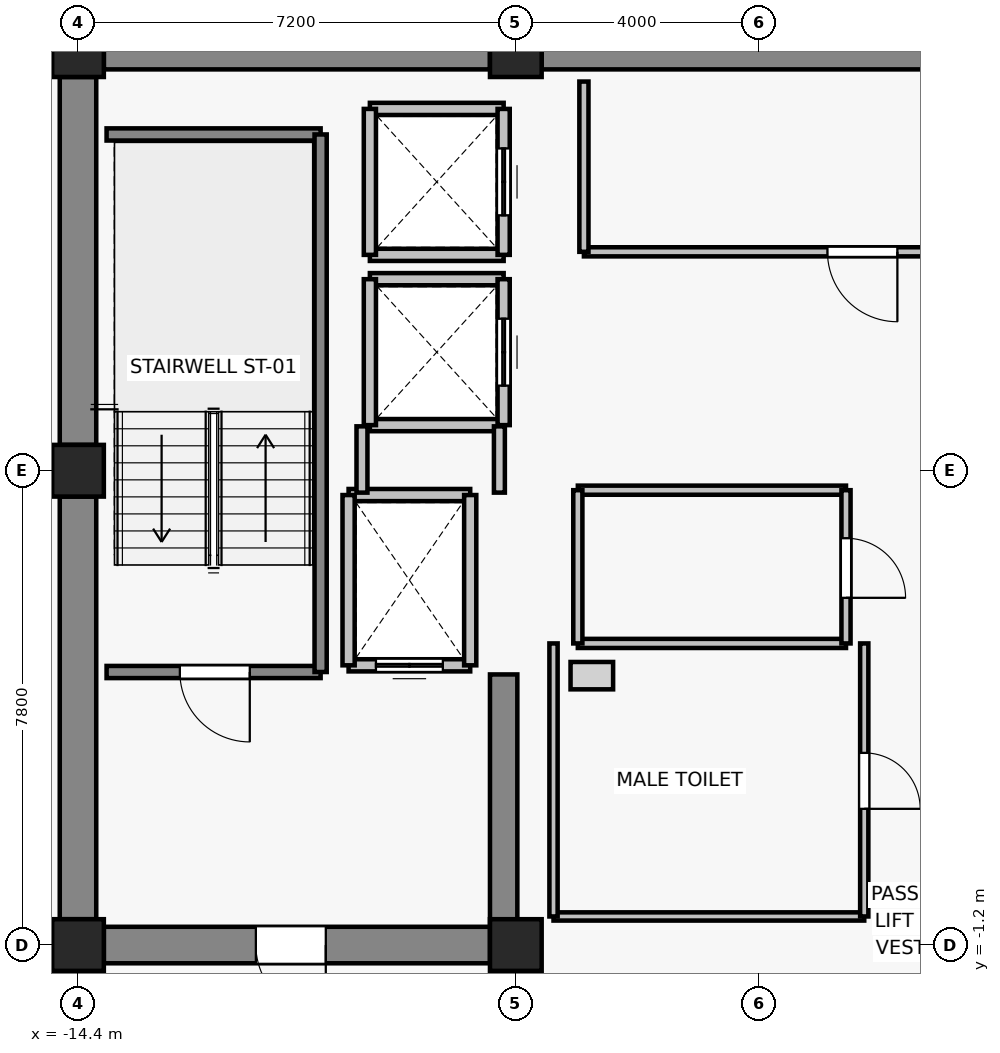
"""IFC4 building model, lengths in metres.
Left out: names, types, materials, properties, quantities, classifications, styles, units other than length and angle.
Written with IfcOpenShell. Run it as: python <this file> out.ifc"""

import sys

from ifc_helpers import new_model, si_unit, direction, frame, frame_2d, origin, origin_2d, place, context, subcontext, project, spatial, rectangle, extrude, source, transform, mapped, element, fill, save


model = new_model("IFC4")
c1 = context("Model", 3, precision=1e-05, world=origin(), true_north=direction((0.0, 1.0)))
c2 = subcontext(c1, "Body", "Model", "MODEL_VIEW")
j1 = project(units=[si_unit("LENGTHUNIT", "METRE"), si_unit("PLANEANGLEUNIT", "RADIAN")], contexts=[c1])
p1 = place(None, origin())
s1 = spatial("IfcSite", under=j1, at=p1, CompositionType="ELEMENT")
p2 = place(p1, origin())
s2 = spatial("IfcBuilding", under=s1, at=p2, CompositionType="ELEMENT")
p3 = place(p2, frame((0.0, 0.0, 232.0)))
s3 = spatial("IfcBuildingStorey", under=s2, at=p3, CompositionType="ELEMENT", Elevation=232.0)
for number, where, z_axis, x_axis in (
    (1, (-14.4, -1.2, 0.0), (0.0, 0.0, 1.0), (1.0, 0.0, 0.0)),
    (2, (-7.2, -1.2, 0.0), (0.0, 0.0, 1.0), (1.0, 0.0, 0.0)),
    (3, (-14.4, 6.6, 0.0), (0.0, 0.0, 1.0), (1.0, 0.0, 0.0)),
    (4, (-14.4, 13.5, 0.0), (0.0, 0.0, 1.0), (1.0, 0.0, 0.0)),
    (5, (-7.2, 13.5, 0.0), (0.0, 0.0, 1.0), (1.0, 0.0, 0.0)),
):
    element("IfcColumn", number, at=place(p3, frame(where, z_axis=z_axis, x_axis=x_axis)), inside=s3, PredefinedType="COLUMN", context=c2, shape_type="SweptSolid", body=[
        extrude(rectangle(XDim=0.85, YDim=0.85, at=origin_2d()), origin(), (0.0, 0.0, 1.0), 3.3),
    ])
p4 = place(p3, frame((-13.975, 13.5, 0.0), z_axis=(0.0, 0.0, 1.0), x_axis=(1.0, 0.0, 0.0)))
e6 = element("IfcWall", 6, at=p4, inside=s3, PredefinedType="SHEAR", context=c2, shape_type="SweptSolid", body=[
    extrude(rectangle(XDim=6.35, YDim=0.6, at=frame_2d((3.175, 0.0))), origin(), (0.0, 0.0, 1.0), 3.075),
])
p5 = place(p3, frame((-6.775, 13.5, 0.0), z_axis=(0.0, 0.0, 1.0), x_axis=(1.0, 0.0, 0.0)))
e7 = element("IfcWall", 7, at=p5, inside=s3, PredefinedType="SHEAR", context=c2, shape_type="SweptSolid", body=[
    extrude(rectangle(XDim=13.55, YDim=0.6, at=frame_2d((6.775, 0.0))), origin(), (0.0, 0.0, 1.0), 3.075),
])
p6 = place(p3, frame((-14.4, -0.775, 0.0), z_axis=(0.0, 0.0, 1.0), x_axis=(0.0, 1.0, 0.0)))
e8 = element("IfcWall", 8, at=p6, inside=s3, PredefinedType="SHEAR", context=c2, shape_type="SweptSolid", body=[
    extrude(rectangle(XDim=6.95, YDim=0.6, at=frame_2d((3.475, 0.0))), origin(), (0.0, 0.0, 1.0), 3.075),
])
p7 = place(p3, frame((-14.4, 7.025, 0.0), z_axis=(0.0, 0.0, 1.0), x_axis=(0.0, 1.0, 0.0)))
e9 = element("IfcWall", 9, at=p7, inside=s3, PredefinedType="SHEAR", context=c2, shape_type="SweptSolid", body=[
    extrude(rectangle(XDim=6.05, YDim=0.6, at=frame_2d((3.025, 0.0))), origin(), (0.0, 0.0, 1.0), 3.075),
])
p8 = place(p3, frame((-7.625, -1.2, 0.0), z_axis=(0.0, 0.0, 1.0), x_axis=(-1.0, 0.0, 0.0)))
e10 = element("IfcWall", 10, at=p8, inside=s3, PredefinedType="SHEAR", context=c2, shape_type="SweptSolid", body=[
    extrude(rectangle(XDim=6.35, YDim=0.6, at=frame_2d((3.175, 0.0))), origin(), (0.0, 0.0, 1.0), 3.075),
])
p9 = place(p8, frame((2.7, 0.0, 0.0)))
e11 = element("IfcOpeningElement", 11, at=p9, cuts=e10, PredefinedType="OPENING", context=c2, shape_type="SweptSolid", body=[
    extrude(rectangle(XDim=1.15, YDim=2.15, at=frame_2d((0.575, 1.075))), frame((0.0, 0.31, 0.0), z_axis=(0.0, -1.0, 0.0), x_axis=(1.0, 0.0, 0.0)), (0.0, 0.0, 1.0), 0.62),
])
p10 = place(p3, frame((-7.4, -0.9, 0.0), z_axis=(0.0, 0.0, 1.0), x_axis=(0.0, 1.0, 0.0)))
e12 = element("IfcWall", 12, at=p10, inside=s3, PredefinedType="SHEAR", context=c2, shape_type="SweptSolid", body=[
    extrude(rectangle(XDim=4.15, YDim=0.45, at=frame_2d((2.075, 0.0))), origin(), (0.0, 0.0, 1.0), 3.075),
])
p11 = place(p3, frame((-7.95, 3.4, 0.0), z_axis=(0.0, 0.0, 1.0), x_axis=(-1.0, 0.0, 0.0)))
e13 = element("IfcWall", 13, at=p11, inside=s3, PredefinedType="SOLIDWALL", context=c2, shape_type="SweptSolid", body=[
    extrude(rectangle(XDim=2.0, YDim=0.2, at=frame_2d((1.0, 0.0))), origin(), (0.0, 0.0, 1.0), 3.075),
])
p12 = place(p11, frame((0.45, 0.0, 0.0)))
e14 = element("IfcOpeningElement", 14, at=p12, cuts=e13, PredefinedType="OPENING", context=c2, shape_type="SweptSolid", body=[
    extrude(rectangle(XDim=1.1, YDim=2.2, at=frame_2d((0.55, 1.1))), frame((0.0, 0.11, 0.0), z_axis=(0.0, -1.0, 0.0), x_axis=(1.0, 0.0, 0.0)), (0.0, 0.0, 1.0), 0.22),
])
p13 = place(p3, frame((-9.95, 6.2, 0.0), z_axis=(0.0, 0.0, 1.0), x_axis=(1.0, 0.0, 0.0)))
e15 = element("IfcWall", 15, at=p13, inside=s3, PredefinedType="SOLIDWALL", context=c2, shape_type="SweptSolid", body=[
    extrude(rectangle(XDim=2.0, YDim=0.2, at=frame_2d((1.0, 0.0))), origin(), (0.0, 0.0, 1.0), 3.075),
])
for number, where, z_axis, x_axis in (
    (16, (-9.95, 3.4, 0.0), (0.0, 0.0, 1.0), (0.0, 1.0, 0.0)),
    (17, (-7.95, 6.2, 0.0), (0.0, 0.0, 1.0), (0.0, -1.0, 0.0)),
):
    element("IfcWall", number, at=place(p3, frame(where, z_axis=z_axis, x_axis=x_axis)), inside=s3, PredefinedType="SOLIDWALL", context=c2, shape_type="SweptSolid", body=[
        extrude(rectangle(XDim=2.8, YDim=0.2, at=frame_2d((1.4, 0.0))), origin(), (0.0, 0.0, 1.0), 3.075),
    ])
for number, where, z_axis, x_axis in (
    (18, (-7.4, 7.35, 0.0), (0.0, 0.0, 1.0), (-1.0, 0.0, 0.0)),
    (19, (-9.6, 9.75, 0.0), (0.0, 0.0, 1.0), (1.0, 0.0, 0.0)),
):
    element("IfcWall", number, at=place(p3, frame(where, z_axis=z_axis, x_axis=x_axis)), inside=s3, PredefinedType="SOLIDWALL", context=c2, shape_type="SweptSolid", body=[
        extrude(rectangle(XDim=2.2, YDim=0.2, at=frame_2d((1.1, 0.0))), origin(), (0.0, 0.0, 1.0), 2.615),
    ])
p14 = place(p3, frame((-9.6, 7.35, 0.0), z_axis=(0.0, 0.0, 1.0), x_axis=(0.0, 1.0, 0.0)))
e20 = element("IfcWall", 20, at=p14, inside=s3, PredefinedType="SOLIDWALL", context=c2, shape_type="SweptSolid", body=[
    extrude(rectangle(XDim=2.4, YDim=0.2, at=frame_2d((1.2, 0.0))), origin(), (0.0, 0.0, 1.0), 3.075),
])
p15 = place(p3, frame((-7.4, 9.75, 0.0), z_axis=(0.0, 0.0, 1.0), x_axis=(0.0, -1.0, 0.0)))
e21 = element("IfcWall", 21, at=p15, inside=s3, PredefinedType="SOLIDWALL", context=c2, shape_type="SweptSolid", body=[
    extrude(rectangle(XDim=2.4, YDim=0.2, at=frame_2d((1.2, 0.0))), origin(), (0.0, 0.0, 1.0), 2.615),
])
p16 = place(p15, frame((0.65, 0.0, 0.0)))
e22 = element("IfcOpeningElement", 22, at=p16, cuts=e21, PredefinedType="OPENING", context=c2, shape_type="SweptSolid", body=[
    extrude(rectangle(XDim=1.1, YDim=2.2, at=frame_2d((0.55, 1.1))), frame((0.0, 0.11, 0.0), z_axis=(0.0, -1.0, 0.0), x_axis=(1.0, 0.0, 0.0)), (0.0, 0.0, 1.0), 0.22),
])
for number, where, z_axis, x_axis in (
    (23, (-7.4, 10.15, 0.0), (0.0, 0.0, 1.0), (-1.0, 0.0, 0.0)),
    (24, (-9.6, 12.55, 0.0), (0.0, 0.0, 1.0), (1.0, 0.0, 0.0)),
):
    element("IfcWall", number, at=place(p3, frame(where, z_axis=z_axis, x_axis=x_axis)), inside=s3, PredefinedType="SOLIDWALL", context=c2, shape_type="SweptSolid", body=[
        extrude(rectangle(XDim=2.2, YDim=0.2, at=frame_2d((1.1, 0.0))), origin(), (0.0, 0.0, 1.0), 2.615),
    ])
p17 = place(p3, frame((-9.6, 10.15, 0.0), z_axis=(0.0, 0.0, 1.0), x_axis=(0.0, 1.0, 0.0)))
e25 = element("IfcWall", 25, at=p17, inside=s3, PredefinedType="SOLIDWALL", context=c2, shape_type="SweptSolid", body=[
    extrude(rectangle(XDim=2.4, YDim=0.2, at=frame_2d((1.2, 0.0))), origin(), (0.0, 0.0, 1.0), 3.075),
])
p18 = place(p3, frame((-7.4, 12.55, 0.0), z_axis=(0.0, 0.0, 1.0), x_axis=(0.0, -1.0, 0.0)))
e26 = element("IfcWall", 26, at=p18, inside=s3, PredefinedType="SOLIDWALL", context=c2, shape_type="SweptSolid", body=[
    extrude(rectangle(XDim=2.4, YDim=0.2, at=frame_2d((1.2, 0.0))), origin(), (0.0, 0.0, 1.0), 2.615),
])
p19 = place(p18, frame((0.65, 0.0, 0.0)))
e27 = element("IfcOpeningElement", 27, at=p19, cuts=e26, PredefinedType="OPENING", context=c2, shape_type="SweptSolid", body=[
    extrude(rectangle(XDim=1.1, YDim=2.2, at=frame_2d((0.55, 1.1))), frame((0.0, 0.11, 0.0), z_axis=(0.0, -1.0, 0.0), x_axis=(1.0, 0.0, 0.0)), (0.0, 0.0, 1.0), 0.22),
])
p20 = place(p3, frame((-10.41, 3.29, 0.0), z_axis=(0.0, 0.0, 1.0), x_axis=(-1.0, 0.0, 0.0)))
e28 = element("IfcWall", 28, at=p20, inside=s3, PredefinedType="SOLIDWALL", context=c2, shape_type="SweptSolid", body=[
    extrude(rectangle(XDim=3.52, YDim=0.2, at=frame_2d((1.76, 0.0))), origin(), (0.0, 0.0, 1.0), 3.075),
])
p21 = place(p20, frame((1.165, 0.0, 0.0)))
e29 = element("IfcOpeningElement", 29, at=p21, cuts=e28, PredefinedType="OPENING", context=c2, shape_type="SweptSolid", body=[
    extrude(rectangle(XDim=1.15, YDim=2.15, at=frame_2d((0.575, 1.075))), frame((0.0, 0.11, 0.0), z_axis=(0.0, -1.0, 0.0), x_axis=(1.0, 0.0, 0.0)), (0.0, 0.0, 1.0), 0.22),
])
p22 = place(p3, frame((-13.93, 12.13, 0.0), z_axis=(0.0, 0.0, 1.0), x_axis=(1.0, 0.0, 0.0)))
e30 = element("IfcWall", 30, at=p22, inside=s3, PredefinedType="SOLIDWALL", context=c2, shape_type="SweptSolid", body=[
    extrude(rectangle(XDim=3.52, YDim=0.2, at=frame_2d((1.76, 0.0))), origin(), (0.0, 0.0, 1.0), 3.075),
])
p23 = place(p3, frame((-10.41, 12.13, 0.0), z_axis=(0.0, 0.0, 1.0), x_axis=(0.0, -1.0, 0.0)))
e31 = element("IfcWall", 31, at=p23, inside=s3, PredefinedType="SOLIDWALL", context=c2, shape_type="SweptSolid", body=[
    extrude(rectangle(XDim=8.84, YDim=0.2, at=frame_2d((4.42, 0.0))), origin(), (0.0, 0.0, 1.0), 3.075),
])
p24 = place(p3, frame((-9.73, 6.24, 0.0), z_axis=(0.0, 0.0, 1.0), x_axis=(0.0, 1.0, 0.0)))
e32 = element("IfcWall", 32, at=p24, inside=s3, PredefinedType="PARTITIONING", context=c2, shape_type="SweptSolid", body=[
    extrude(rectangle(XDim=1.09, YDim=0.18, at=frame_2d((0.545, 0.0))), origin(), (0.0, 0.0, 1.0), 3.075),
])
p25 = place(p3, frame((-7.47, 7.33, 0.0), z_axis=(0.0, 0.0, 1.0), x_axis=(0.0, -1.0, 0.0)))
e33 = element("IfcWall", 33, at=p25, inside=s3, PredefinedType="PARTITIONING", context=c2, shape_type="SweptSolid", body=[
    extrude(rectangle(XDim=1.09, YDim=0.18, at=frame_2d((0.545, 0.0))), origin(), (0.0, 0.0, 1.0), 2.615),
])
p26 = place(p3, frame((6.08, 10.2, 0.0), z_axis=(0.0, 0.0, 1.0), x_axis=(-1.0, 0.0, 0.0)))
e34 = element("IfcWall", 34, at=p26, inside=s3, PredefinedType="PARTITIONING", context=c2, shape_type="SweptSolid", body=[
    extrude(rectangle(XDim=12.16, YDim=0.15, at=frame_2d((6.08, 0.0))), origin(), (0.0, 0.0, 1.0), 2.59),
])
p27 = place(p26, frame((7.005, 0.0, 0.0)))
e35 = element("IfcOpeningElement", 35, at=p27, cuts=e34, PredefinedType="OPENING", context=c2, shape_type="SweptSolid", body=[
    extrude(rectangle(XDim=1.15, YDim=2.15, at=frame_2d((0.575, 1.075))), frame((0.0, 0.085, 0.0), z_axis=(0.0, -1.0, 0.0), x_axis=(1.0, 0.0, 0.0)), (0.0, 0.0, 1.0), 0.17),
])
p28 = place(p3, frame((-6.08, 10.2, 0.0), z_axis=(0.0, 0.0, 1.0), x_axis=(0.0, 1.0, 0.0)))
e36 = element("IfcWall", 36, at=p28, inside=s3, PredefinedType="PARTITIONING", context=c2, shape_type="SweptSolid", body=[
    extrude(rectangle(XDim=2.8, YDim=0.15, at=frame_2d((1.4, 0.0))), origin(), (0.0, 0.0, 1.0), 3.075),
])
for number, where, z_axis, x_axis in (
    (37, (-1.77, 3.76, 0.0), (0.0, 0.0, 1.0), (-1.0, 0.0, 0.0)),
    (38, (-6.18, 6.28, 0.0), (0.0, 0.0, 1.0), (1.0, 0.0, 0.0)),
):
    element("IfcWall", number, at=place(p3, frame(where, z_axis=z_axis, x_axis=x_axis)), inside=s3, PredefinedType="PARTITIONING", context=c2, shape_type="SweptSolid", body=[
        extrude(rectangle(XDim=4.41, YDim=0.15, at=frame_2d((2.205, 0.0))), origin(), (0.0, 0.0, 1.0), 3.075),
    ])
p29 = place(p3, frame((-6.18, 3.76, 0.0), z_axis=(0.0, 0.0, 1.0), x_axis=(0.0, 1.0, 0.0)))
e39 = element("IfcWall", 39, at=p29, inside=s3, PredefinedType="PARTITIONING", context=c2, shape_type="SweptSolid", body=[
    extrude(rectangle(XDim=2.52, YDim=0.15, at=frame_2d((1.26, 0.0))), origin(), (0.0, 0.0, 1.0), 3.075),
])
p30 = place(p3, frame((-1.77, 6.28, 0.0), z_axis=(0.0, 0.0, 1.0), x_axis=(0.0, -1.0, 0.0)))
e40 = element("IfcWall", 40, at=p30, inside=s3, PredefinedType="PARTITIONING", context=c2, shape_type="SweptSolid", body=[
    extrude(rectangle(XDim=2.52, YDim=0.15, at=frame_2d((1.26, 0.0))), origin(), (0.0, 0.0, 1.0), 3.075),
])
p31 = place(p30, frame((0.79, 0.0, 0.0)))
e41 = element("IfcOpeningElement", 41, at=p31, cuts=e40, PredefinedType="OPENING", context=c2, shape_type="SweptSolid", body=[
    extrude(rectangle(XDim=0.98, YDim=2.15, at=frame_2d((0.49, 1.075))), frame((0.0, 0.085, 0.0), z_axis=(0.0, -1.0, 0.0), x_axis=(1.0, 0.0, 0.0)), (0.0, 0.0, 1.0), 0.17),
])
p32 = place(p3, frame((-1.47, -0.73, 0.0), z_axis=(0.0, 0.0, 1.0), x_axis=(-1.0, 0.0, 0.0)))
e42 = element("IfcWall", 42, at=p32, inside=s3, PredefinedType="PARTITIONING", context=c2, shape_type="SweptSolid", body=[
    extrude(rectangle(XDim=5.11, YDim=0.135, at=frame_2d((2.555, 0.0))), origin(), (0.0, 0.0, 1.0), 3.075),
])
p33 = place(p3, frame((-6.58, -0.73, 0.0), z_axis=(0.0, 0.0, 1.0), x_axis=(0.0, 1.0, 0.0)))
e43 = element("IfcWall", 43, at=p33, inside=s3, PredefinedType="PARTITIONING", context=c2, shape_type="SweptSolid", body=[
    extrude(rectangle(XDim=4.49, YDim=0.135, at=frame_2d((2.245, 0.0))), origin(), (0.0, 0.0, 1.0), 3.075),
])
p34 = place(p3, frame((-1.47, 3.76, 0.0), z_axis=(0.0, 0.0, 1.0), x_axis=(0.0, -1.0, 0.0)))
e44 = element("IfcWall", 44, at=p34, inside=s3, PredefinedType="PARTITIONING", context=c2, shape_type="SweptSolid", body=[
    extrude(rectangle(XDim=4.49, YDim=0.135, at=frame_2d((2.245, 0.0))), origin(), (0.0, 0.0, 1.0), 3.075),
])
p35 = place(p34, frame((1.8, 0.0, 0.0)))
e45 = element("IfcOpeningElement", 45, at=p35, cuts=e44, PredefinedType="OPENING", context=c2, shape_type="SweptSolid", body=[
    extrude(rectangle(XDim=0.92, YDim=2.1, at=frame_2d((0.46, 1.05))), frame((0.0, 0.077, 0.0), z_axis=(0.0, -1.0, 0.0), x_axis=(1.0, 0.0, 0.0)), (0.0, 0.0, 1.0), 0.155),
])
m1 = source(origin(), c2, "Body", "SweptSolid", [
    extrude(rectangle(XDim=1.1, YDim=2.2, at=frame_2d((0.55, 1.1))), frame((0.0, 0.025, 0.0), z_axis=(0.0, -1.0, 0.0), x_axis=(1.0, 0.0, 0.0)), (0.0, 0.0, 1.0), 0.05),
])
p36 = place(p12, origin())
e46 = element("IfcDoor", 46, at=p36, inside=s3, OperationType="DOUBLE_DOOR_SLIDING", PredefinedType="DOOR", context=c2, shape_type="MappedRepresentation", body=[
    mapped(m1, transform((0.0, 0.0, 0.0), x_axis=(1.0, 0.0, 0.0), y_axis=(0.0, 1.0, 0.0), z_axis=(0.0, 0.0, 1.0), scale=1.0)),
])
fill(e14, e46)
p37 = place(p16, origin())
e47 = element("IfcDoor", 47, at=p37, inside=s3, OperationType="DOUBLE_DOOR_SLIDING", PredefinedType="DOOR", context=c2, shape_type="MappedRepresentation", body=[
    mapped(m1, transform((0.0, 0.0, 0.0), x_axis=(1.0, 0.0, 0.0), y_axis=(0.0, 1.0, 0.0), z_axis=(0.0, 0.0, 1.0), scale=1.0)),
])
fill(e22, e47)
p38 = place(p19, origin())
e48 = element("IfcDoor", 48, at=p38, inside=s3, OperationType="DOUBLE_DOOR_SLIDING", PredefinedType="DOOR", context=c2, shape_type="MappedRepresentation", body=[
    mapped(m1, transform((0.0, 0.0, 0.0), x_axis=(1.0, 0.0, 0.0), y_axis=(0.0, 1.0, 0.0), z_axis=(0.0, 0.0, 1.0), scale=1.0)),
])
fill(e27, e48)
m2 = source(origin(), c2, "Body", "SweptSolid", [
    extrude(rectangle(XDim=1.15, YDim=2.15, at=frame_2d((0.575, 1.075))), frame((0.0, 0.025, 0.0), z_axis=(0.0, -1.0, 0.0), x_axis=(1.0, 0.0, 0.0)), (0.0, 0.0, 1.0), 0.05),
])
p39 = place(p21, origin())
e49 = element("IfcDoor", 49, at=p39, inside=s3, OperationType="SINGLE_SWING_LEFT", PredefinedType="DOOR", context=c2, shape_type="MappedRepresentation", body=[
    mapped(m2, transform((0.0, 0.0, 0.0), x_axis=(1.0, 0.0, 0.0), y_axis=(0.0, 1.0, 0.0), z_axis=(0.0, 0.0, 1.0), scale=1.0)),
])
fill(e29, e49)
p40 = place(p9, origin())
e50 = element("IfcDoor", 50, at=p40, inside=s3, OperationType="SINGLE_SWING_LEFT", PredefinedType="DOOR", context=c2, shape_type="MappedRepresentation", body=[
    mapped(m2, transform((0.0, 0.0, 0.0), x_axis=(1.0, 0.0, 0.0), y_axis=(0.0, 1.0, 0.0), z_axis=(0.0, 0.0, 1.0), scale=1.0)),
])
fill(e11, e50)
p41 = place(p27, origin())
e51 = element("IfcDoor", 51, at=p41, inside=s3, OperationType="SINGLE_SWING_LEFT", PredefinedType="DOOR", context=c2, shape_type="MappedRepresentation", body=[
    mapped(m2, transform((0.0, 0.0, 0.0), x_axis=(1.0, 0.0, 0.0), y_axis=(0.0, 1.0, 0.0), z_axis=(0.0, 0.0, 1.0), scale=1.0)),
])
fill(e35, e51)
m3 = source(origin(), c2, "Body", "SweptSolid", [
    extrude(rectangle(XDim=0.98, YDim=2.15, at=frame_2d((0.49, 1.075))), frame((0.0, 0.025, 0.0), z_axis=(0.0, -1.0, 0.0), x_axis=(1.0, 0.0, 0.0)), (0.0, 0.0, 1.0), 0.05),
])
p42 = place(p31, origin())
e52 = element("IfcDoor", 52, at=p42, inside=s3, OperationType="SINGLE_SWING_RIGHT", PredefinedType="DOOR", context=c2, shape_type="MappedRepresentation", body=[
    mapped(m3, transform((0.0, 0.0, 0.0), x_axis=(1.0, 0.0, 0.0), y_axis=(0.0, 1.0, 0.0), z_axis=(0.0, 0.0, 1.0), scale=1.0)),
])
fill(e41, e52)
m4 = source(origin(), c2, "Body", "SweptSolid", [
    extrude(rectangle(XDim=0.92, YDim=2.1, at=frame_2d((0.46, 1.05))), frame((0.0, 0.025, 0.0), z_axis=(0.0, -1.0, 0.0), x_axis=(1.0, 0.0, 0.0)), (0.0, 0.0, 1.0), 0.05),
])
p43 = place(p35, origin())
e53 = element("IfcDoor", 53, at=p43, inside=s3, OperationType="SINGLE_SWING_RIGHT", PredefinedType="DOOR", context=c2, shape_type="MappedRepresentation", body=[
    mapped(m4, transform((0.0, 0.0, 0.0), x_axis=(1.0, 0.0, 0.0), y_axis=(0.0, 1.0, 0.0), z_axis=(0.0, 0.0, 1.0), scale=1.0)),
])
fill(e45, e53)
save(model, sys.argv[1])
